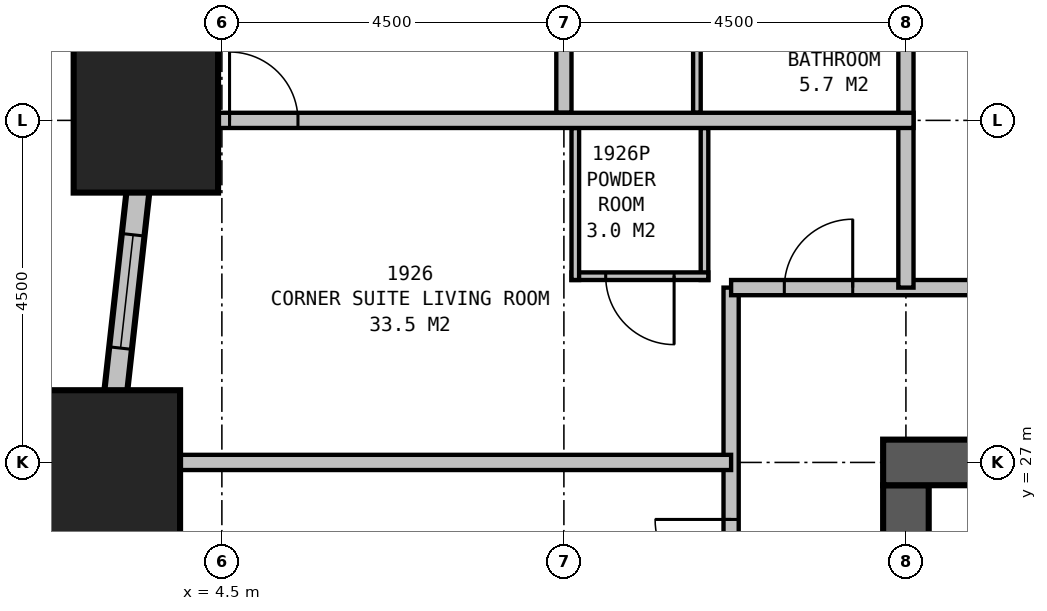
"""IFC4 building model, lengths in metres.
Left out: names, types, materials, properties, quantities, classifications, styles, units other than length and angle.
Written with IfcOpenShell. Run it as: python <this file> out.ifc"""

import sys

from ifc_helpers import new_model, si_unit, direction, frame, frame_2d, origin, origin_2d, place, context, subcontext, project, spatial, rectangle, extrude, element, fill, save


model = new_model("IFC4")
c1 = context("Model", 3, precision=1e-05, world=origin(), true_north=direction((0.0, 1.0)))
c2 = subcontext(c1, "Body", "Model", "MODEL_VIEW")
j1 = project(units=[si_unit("LENGTHUNIT", "METRE"), si_unit("PLANEANGLEUNIT", "RADIAN")], contexts=[c1])
p1 = place(None, origin())
s1 = spatial("IfcSite", under=j1, at=p1, CompositionType="ELEMENT")
p2 = place(p1, origin())
s2 = spatial("IfcBuilding", under=s1, at=p2, CompositionType="ELEMENT")
p3 = place(p2, frame((0.0, 0.0, 78.7)))
s3 = spatial("IfcBuildingStorey", under=s2, at=p3, CompositionType="ELEMENT", Elevation=78.7)
for number, where, z_axis, x_axis in (
    (1, (3.5, 31.5, 0.0), (0.0, 0.0, 1.0), (1.0, 0.0, 0.0)),
    (2, (3.0, 27.0, 0.0), (0.0, 0.0, 1.0), (1.0, 0.0, 0.0)),
):
    element("IfcColumn", number, at=place(p3, frame(where, z_axis=z_axis, x_axis=x_axis)), inside=s3, PredefinedType="COLUMN", context=c2, shape_type="SweptSolid", body=[
        extrude(rectangle(XDim=1.9, YDim=1.9, at=origin_2d()), origin(), (0.0, 0.0, 1.0), 3.5),
    ])
p4 = place(p3, frame((36.3, 27.0, 0.0), z_axis=(0.0, 0.0, 1.0), x_axis=(-1.0, 0.0, 0.0)))
e3 = element("IfcWall", 3, at=p4, inside=s3, PredefinedType="SHEAR", context=c2, shape_type="SweptSolid", body=[
    extrude(rectangle(XDim=23.1, YDim=0.6, at=frame_2d((11.55, 0.0))), origin(), (0.0, 0.0, 1.0), 3.5),
])
p5 = place(p4, frame((17.05, 0.0, 0.0)))
e4 = element("IfcOpeningElement", 4, at=p5, cuts=e3, PredefinedType="OPENING", context=c2, shape_type="SweptSolid", body=[
    extrude(rectangle(XDim=1.0, YDim=2.1, at=frame_2d((0.5, 1.05))), frame((0.0, 0.31, 0.0), z_axis=(0.0, -1.0, 0.0), x_axis=(1.0, 0.0, 0.0)), (0.0, 0.0, 1.0), 0.62),
])
p6 = place(p4, frame((12.05, 0.0, 0.0)))
e5 = element("IfcOpeningElement", 5, at=p6, cuts=e3, PredefinedType="OPENING", context=c2, shape_type="SweptSolid", body=[
    extrude(rectangle(XDim=1.0, YDim=2.1, at=frame_2d((0.5, 1.05))), frame((0.0, 0.31, 0.0), z_axis=(0.0, -1.0, 0.0), x_axis=(1.0, 0.0, 0.0)), (0.0, 0.0, 1.0), 0.62),
])
p7 = place(p4, frame((7.05, 0.0, 0.0)))
e6 = element("IfcOpeningElement", 6, at=p7, cuts=e3, PredefinedType="OPENING", context=c2, shape_type="SweptSolid", body=[
    extrude(rectangle(XDim=1.0, YDim=2.1, at=frame_2d((0.5, 1.05))), frame((0.0, 0.31, 0.0), z_axis=(0.0, -1.0, 0.0), x_axis=(1.0, 0.0, 0.0)), (0.0, 0.0, 1.0), 0.62),
])
p8 = place(p3, frame((13.5, 26.7, 0.0), z_axis=(0.0, 0.0, 1.0), x_axis=(0.0, -1.0, 0.0)))
e7 = element("IfcWall", 7, at=p8, inside=s3, PredefinedType="SHEAR", context=c2, shape_type="SweptSolid", body=[
    extrude(rectangle(XDim=6.7, YDim=0.6, at=frame_2d((3.35, 0.0))), origin(), (0.0, 0.0, 1.0), 3.5),
])
p9 = place(p3, frame((4.017, 36.149, 0.0), z_axis=(0.0, 0.0, 1.0), x_axis=(-0.110433201132, -0.993883548555, 0.0)))
e8 = element("IfcWall", 8, at=p9, inside=s3, PredefinedType="STANDARD", context=c2, shape_type="SweptSolid", body=[
    extrude(rectangle(XDim=31.994, YDim=0.3, at=frame_2d((15.997, 0.0))), origin(), (0.0, 0.0, 1.0), 2.05),
])
p10 = place(p9, frame((1.664, 0.0, 0.5)))
e9 = element("IfcOpeningElement", 9, at=p10, cuts=e8, PredefinedType="OPENING", context=c2, shape_type="SweptSolid", body=[
    extrude(rectangle(XDim=1.5, YDim=1.4, at=frame_2d((0.75, 0.7))), frame((0.0, 0.16, 0.0), z_axis=(0.0, -1.0, 0.0), x_axis=(1.0, 0.0, 0.0)), (0.0, 0.0, 1.0), 0.32),
])
p11 = place(p9, frame((6.192, 0.0, 0.5)))
e10 = element("IfcOpeningElement", 10, at=p11, cuts=e8, PredefinedType="OPENING", context=c2, shape_type="SweptSolid", body=[
    extrude(rectangle(XDim=1.5, YDim=1.4, at=frame_2d((0.75, 0.7))), frame((0.0, 0.16, 0.0), z_axis=(0.0, -1.0, 0.0), x_axis=(1.0, 0.0, 0.0)), (0.0, 0.0, 1.0), 0.32),
])
p12 = place(p9, frame((10.719, 0.0, 0.5)))
e11 = element("IfcOpeningElement", 11, at=p12, cuts=e8, PredefinedType="OPENING", context=c2, shape_type="SweptSolid", body=[
    extrude(rectangle(XDim=1.5, YDim=1.4, at=frame_2d((0.75, 0.7))), frame((0.0, 0.16, 0.0), z_axis=(0.0, -1.0, 0.0), x_axis=(1.0, 0.0, 0.0)), (0.0, 0.0, 1.0), 0.32),
])
p13 = place(p9, frame((15.247, 0.0, 0.5)))
e12 = element("IfcOpeningElement", 12, at=p13, cuts=e8, PredefinedType="OPENING", context=c2, shape_type="SweptSolid", body=[
    extrude(rectangle(XDim=1.5, YDim=1.4, at=frame_2d((0.75, 0.7))), frame((0.0, 0.16, 0.0), z_axis=(0.0, -1.0, 0.0), x_axis=(1.0, 0.0, 0.0)), (0.0, 0.0, 1.0), 0.32),
])
p14 = place(p9, frame((19.775, 0.0, 0.5)))
e13 = element("IfcOpeningElement", 13, at=p14, cuts=e8, PredefinedType="OPENING", context=c2, shape_type="SweptSolid", body=[
    extrude(rectangle(XDim=1.5, YDim=1.4, at=frame_2d((0.75, 0.7))), frame((0.0, 0.16, 0.0), z_axis=(0.0, -1.0, 0.0), x_axis=(1.0, 0.0, 0.0)), (0.0, 0.0, 1.0), 0.32),
])
p15 = place(p9, frame((24.302, 0.0, 0.5)))
e14 = element("IfcOpeningElement", 14, at=p15, cuts=e8, PredefinedType="OPENING", context=c2, shape_type="SweptSolid", body=[
    extrude(rectangle(XDim=1.5, YDim=1.4, at=frame_2d((0.75, 0.7))), frame((0.0, 0.16, 0.0), z_axis=(0.0, -1.0, 0.0), x_axis=(1.0, 0.0, 0.0)), (0.0, 0.0, 1.0), 0.32),
])
p16 = place(p9, frame((28.83, 0.0, 0.5)))
e15 = element("IfcOpeningElement", 15, at=p16, cuts=e8, PredefinedType="OPENING", context=c2, shape_type="SweptSolid", body=[
    extrude(rectangle(XDim=1.5, YDim=1.4, at=frame_2d((0.75, 0.7))), frame((0.0, 0.16, 0.0), z_axis=(0.0, -1.0, 0.0), x_axis=(1.0, 0.0, 0.0)), (0.0, 0.0, 1.0), 0.32),
])
p17 = place(p3, frame((11.2, 29.3, 0.0), z_axis=(0.0, 0.0, 1.0), x_axis=(1.0, 0.0, 0.0)))
e16 = element("IfcWall", 16, at=p17, inside=s3, PredefinedType="PARTITIONING", context=c2, shape_type="SweptSolid", body=[
    extrude(rectangle(XDim=27.1, YDim=0.2, at=frame_2d((13.55, 0.0))), origin(), (0.0, 0.0, 1.0), 3.25),
])
p18 = place(p17, frame((4.2, 0.0, 0.0)))
e17 = element("IfcOpeningElement", 17, at=p18, cuts=e16, PredefinedType="OPENING", context=c2, shape_type="SweptSolid", body=[
    extrude(rectangle(XDim=0.9, YDim=2.1, at=frame_2d((0.45, 1.05))), frame((0.0, 0.11, 0.0), z_axis=(0.0, -1.0, 0.0), x_axis=(1.0, 0.0, 0.0)), (0.0, 0.0, 1.0), 0.22),
])
p19 = place(p17, frame((8.7, 0.0, 0.0)))
e18 = element("IfcOpeningElement", 18, at=p19, cuts=e16, PredefinedType="OPENING", context=c2, shape_type="SweptSolid", body=[
    extrude(rectangle(XDim=0.9, YDim=2.1, at=frame_2d((0.45, 1.05))), frame((0.0, 0.11, 0.0), z_axis=(0.0, -1.0, 0.0), x_axis=(1.0, 0.0, 0.0)), (0.0, 0.0, 1.0), 0.22),
])
p20 = place(p17, frame((13.2, 0.0, 0.0)))
e19 = element("IfcOpeningElement", 19, at=p20, cuts=e16, PredefinedType="OPENING", context=c2, shape_type="SweptSolid", body=[
    extrude(rectangle(XDim=0.9, YDim=2.1, at=frame_2d((0.45, 1.05))), frame((0.0, 0.11, 0.0), z_axis=(0.0, -1.0, 0.0), x_axis=(1.0, 0.0, 0.0)), (0.0, 0.0, 1.0), 0.22),
])
p21 = place(p17, frame((17.55, 0.0, 0.0)))
e20 = element("IfcOpeningElement", 20, at=p21, cuts=e16, PredefinedType="OPENING", context=c2, shape_type="SweptSolid", body=[
    extrude(rectangle(XDim=0.9, YDim=2.1, at=frame_2d((0.45, 1.05))), frame((0.0, 0.11, 0.0), z_axis=(0.0, -1.0, 0.0), x_axis=(1.0, 0.0, 0.0)), (0.0, 0.0, 1.0), 0.22),
])
p22 = place(p17, frame((23.1, 0.0, 0.0)))
e21 = element("IfcOpeningElement", 21, at=p22, cuts=e16, PredefinedType="OPENING", context=c2, shape_type="SweptSolid", body=[
    extrude(rectangle(XDim=1.0, YDim=2.1, at=frame_2d((0.5, 1.05))), frame((0.0, 0.11, 0.0), z_axis=(0.0, -1.0, 0.0), x_axis=(1.0, 0.0, 0.0)), (0.0, 0.0, 1.0), 0.22),
])
p23 = place(p17, frame((25.5, 0.0, 0.0)))
e22 = element("IfcOpeningElement", 22, at=p23, cuts=e16, PredefinedType="OPENING", context=c2, shape_type="SweptSolid", body=[
    extrude(rectangle(XDim=0.9, YDim=2.1, at=frame_2d((0.45, 1.05))), frame((0.0, 0.11, 0.0), z_axis=(0.0, -1.0, 0.0), x_axis=(1.0, 0.0, 0.0)), (0.0, 0.0, 1.0), 0.22),
])
p24 = place(p17, frame((0.7, 0.0, 0.0)))
e23 = element("IfcOpeningElement", 23, at=p24, cuts=e16, PredefinedType="OPENING", context=c2, shape_type="SweptSolid", body=[
    extrude(rectangle(XDim=0.9, YDim=2.1, at=frame_2d((0.45, 1.05))), frame((0.0, 0.11, 0.0), z_axis=(0.0, -1.0, 0.0), x_axis=(1.0, 0.0, 0.0)), (0.0, 0.0, 1.0), 0.22),
])
p25 = place(p3, frame((11.2, 10.6, 0.0), z_axis=(0.0, 0.0, 1.0), x_axis=(0.0, 1.0, 0.0)))
e24 = element("IfcWall", 24, at=p25, inside=s3, PredefinedType="PARTITIONING", context=c2, shape_type="SweptSolid", body=[
    extrude(rectangle(XDim=18.7, YDim=0.2, at=frame_2d((9.35, 0.0))), origin(), (0.0, 0.0, 1.0), 3.25),
])
p26 = place(p25, frame((4.75, 0.0, 0.0)))
e25 = element("IfcOpeningElement", 25, at=p26, cuts=e24, PredefinedType="OPENING", context=c2, shape_type="SweptSolid", body=[
    extrude(rectangle(XDim=0.9, YDim=2.1, at=frame_2d((0.45, 1.05))), frame((0.0, 0.11, 0.0), z_axis=(0.0, -1.0, 0.0), x_axis=(1.0, 0.0, 0.0)), (0.0, 0.0, 1.0), 0.22),
])
p27 = place(p25, frame((14.65, 0.0, 0.0)))
e26 = element("IfcOpeningElement", 26, at=p27, cuts=e24, PredefinedType="OPENING", context=c2, shape_type="SweptSolid", body=[
    extrude(rectangle(XDim=1.0, YDim=2.1, at=frame_2d((0.5, 1.05))), frame((0.0, 0.11, 0.0), z_axis=(0.0, -1.0, 0.0), x_axis=(1.0, 0.0, 0.0)), (0.0, 0.0, 1.0), 0.22),
])
p28 = place(p3, frame((11.2, 27.0, 0.0), z_axis=(0.0, 0.0, 1.0), x_axis=(-1.0, 0.0, 0.0)))
e27 = element("IfcWall", 27, at=p28, inside=s3, PredefinedType="PARTITIONING", context=c2, shape_type="SweptSolid", body=[
    extrude(rectangle(XDim=7.977, YDim=0.2, at=frame_2d((3.988, 0.0))), origin(), (0.0, 0.0, 1.0), 1.95),
])
p29 = place(p3, frame((13.5, 29.3, 0.0), z_axis=(0.0, 0.0, 1.0), x_axis=(0.0, 1.0, 0.0)))
e28 = element("IfcWall", 28, at=p29, inside=s3, PredefinedType="PARTITIONING", context=c2, shape_type="SweptSolid", body=[
    extrude(rectangle(XDim=11.2, YDim=0.2, at=frame_2d((5.6, 0.0))), origin(), (0.0, 0.0, 1.0), 2.25),
])
p30 = place(p3, frame((13.6, 31.5, 0.0), z_axis=(0.0, 0.0, 1.0), x_axis=(-1.0, 0.0, 0.0)))
e29 = element("IfcWall", 29, at=p30, inside=s3, PredefinedType="PARTITIONING", context=c2, shape_type="SweptSolid", body=[
    extrude(rectangle(XDim=10.099, YDim=0.2, at=frame_2d((5.05, 0.0))), origin(), (0.0, 0.0, 1.0), 3.25),
])
p31 = place(p30, frame((8.999, 0.0, 0.0), z_axis=(0.0, 0.0, 1.0), x_axis=(-1.0, 0.0, 0.0)))
e30 = element("IfcOpeningElement", 30, at=p31, cuts=e29, PredefinedType="OPENING", context=c2, shape_type="SweptSolid", body=[
    extrude(rectangle(XDim=0.9, YDim=2.1, at=frame_2d((0.45, 1.05))), frame((0.0, 0.11, 0.0), z_axis=(0.0, -1.0, 0.0), x_axis=(1.0, 0.0, 0.0)), (0.0, 0.0, 1.0), 0.22),
])
p32 = place(p3, frame((9.15, 31.4, 0.0), z_axis=(0.0, 0.0, 1.0), x_axis=(0.0, -1.0, 0.0)))
e31 = element("IfcWall", 31, at=p32, inside=s3, PredefinedType="PLUMBINGWALL", context=c2, shape_type="SweptSolid", body=[
    extrude(rectangle(XDim=2.0, YDim=0.1, at=frame_2d((1.0, 0.0))), origin(), (0.0, 0.0, 1.0), 2.25),
])
p33 = place(p3, frame((10.85, 31.4, 0.0), z_axis=(0.0, 0.0, 1.0), x_axis=(0.0, -1.0, 0.0)))
e32 = element("IfcWall", 32, at=p33, inside=s3, PredefinedType="PLUMBINGWALL", context=c2, shape_type="SweptSolid", body=[
    extrude(rectangle(XDim=2.0, YDim=0.1, at=frame_2d((1.0, 0.0))), origin(), (0.0, 0.0, 1.0), 3.25),
])
p34 = place(p3, frame((10.9, 29.45, 0.0), z_axis=(0.0, 0.0, 1.0), x_axis=(-1.0, 0.0, 0.0)))
e33 = element("IfcWall", 33, at=p34, inside=s3, PredefinedType="PLUMBINGWALL", context=c2, shape_type="SweptSolid", body=[
    extrude(rectangle(XDim=1.8, YDim=0.1, at=frame_2d((0.9, 0.0))), origin(), (0.0, 0.0, 1.0), 3.25),
])
p35 = place(p34, frame((0.45, 0.0, 0.0)))
e34 = element("IfcOpeningElement", 34, at=p35, cuts=e33, PredefinedType="OPENING", context=c2, shape_type="SweptSolid", body=[
    extrude(rectangle(XDim=0.9, YDim=2.1, at=frame_2d((0.45, 1.05))), frame((0.0, 0.06, 0.0), z_axis=(0.0, -1.0, 0.0), x_axis=(1.0, 0.0, 0.0)), (0.0, 0.0, 1.0), 0.12),
])
p36 = place(p3, frame((9.0, 31.6, 0.0), z_axis=(0.0, 0.0, 1.0), x_axis=(0.0, 1.0, 0.0)))
e35 = element("IfcWall", 35, at=p36, inside=s3, PredefinedType="PARTITIONING", context=c2, shape_type="SweptSolid", body=[
    extrude(rectangle(XDim=4.4, YDim=0.2, at=frame_2d((2.2, 0.0))), origin(), (0.0, 0.0, 1.0), 2.25),
])
p37 = place(p36, frame((2.4, 0.0, 0.0)))
e36 = element("IfcOpeningElement", 36, at=p37, cuts=e35, PredefinedType="OPENING", context=c2, shape_type="SweptSolid", body=[
    extrude(rectangle(XDim=0.9, YDim=2.1, at=frame_2d((0.45, 1.05))), frame((0.0, 0.11, 0.0), z_axis=(0.0, -1.0, 0.0), x_axis=(1.0, 0.0, 0.0)), (0.0, 0.0, 1.0), 0.22),
])
p38 = place(p3, frame((10.75, 31.6, 0.0), z_axis=(0.0, 0.0, 1.0), x_axis=(0.0, 1.0, 0.0)))
e37 = element("IfcWall", 37, at=p38, inside=s3, PredefinedType="PLUMBINGWALL", context=c2, shape_type="SweptSolid", body=[
    extrude(rectangle(XDim=2.3, YDim=0.1, at=frame_2d((1.15, 0.0))), origin(), (0.0, 0.0, 1.0), 3.25),
])
p39 = place(p11, origin())
e38 = element("IfcWindow", 38, at=p39, inside=s3, PartitioningType="SINGLE_PANEL", PredefinedType="WINDOW", context=c2, shape_type="SweptSolid", body=[
    extrude(rectangle(XDim=1.5, YDim=1.4, at=frame_2d((0.75, 0.7))), frame((0.0, 0.03, 0.0), z_axis=(0.0, -1.0, 0.0), x_axis=(1.0, 0.0, 0.0)), (0.0, 0.0, 1.0), 0.06),
])
fill(e10, e38)
p40 = place(p24, origin())
e39 = element("IfcDoor", 39, at=p40, inside=s3, OperationType="SINGLE_SWING_RIGHT", PredefinedType="DOOR", context=c2, shape_type="SweptSolid", body=[
    extrude(rectangle(XDim=0.9, YDim=2.1, at=frame_2d((0.45, 1.05))), frame((0.0, 0.025, 0.0), z_axis=(0.0, -1.0, 0.0), x_axis=(1.0, 0.0, 0.0)), (0.0, 0.0, 1.0), 0.05),
])
fill(e23, e39)
p41 = place(p27, origin())
e40 = element("IfcDoor", 40, at=p41, inside=s3, OperationType="SINGLE_SWING_RIGHT", PredefinedType="DOOR", context=c2, shape_type="SweptSolid", body=[
    extrude(rectangle(XDim=1.0, YDim=2.1, at=frame_2d((0.5, 1.05))), frame((0.0, 0.025, 0.0), z_axis=(0.0, -1.0, 0.0), x_axis=(1.0, 0.0, 0.0)), (0.0, 0.0, 1.0), 0.05),
])
fill(e26, e40)
p42 = place(p31, origin())
e41 = element("IfcDoor", 41, at=p42, inside=s3, OperationType="SINGLE_SWING_LEFT", PredefinedType="DOOR", context=c2, shape_type="SweptSolid", body=[
    extrude(rectangle(XDim=0.9, YDim=2.1, at=frame_2d((0.45, 1.05))), frame((0.0, 0.025, 0.0), z_axis=(0.0, -1.0, 0.0), x_axis=(1.0, 0.0, 0.0)), (0.0, 0.0, 1.0), 0.05),
])
fill(e30, e41)
p43 = place(p35, origin())
e42 = element("IfcDoor", 42, at=p43, inside=s3, OperationType="SINGLE_SWING_LEFT", PredefinedType="DOOR", context=c2, shape_type="SweptSolid", body=[
    extrude(rectangle(XDim=0.9, YDim=2.1, at=frame_2d((0.45, 1.05))), frame((0.0, 0.025, 0.0), z_axis=(0.0, -1.0, 0.0), x_axis=(1.0, 0.0, 0.0)), (0.0, 0.0, 1.0), 0.05),
])
fill(e34, e42)
save(model, sys.argv[1])
